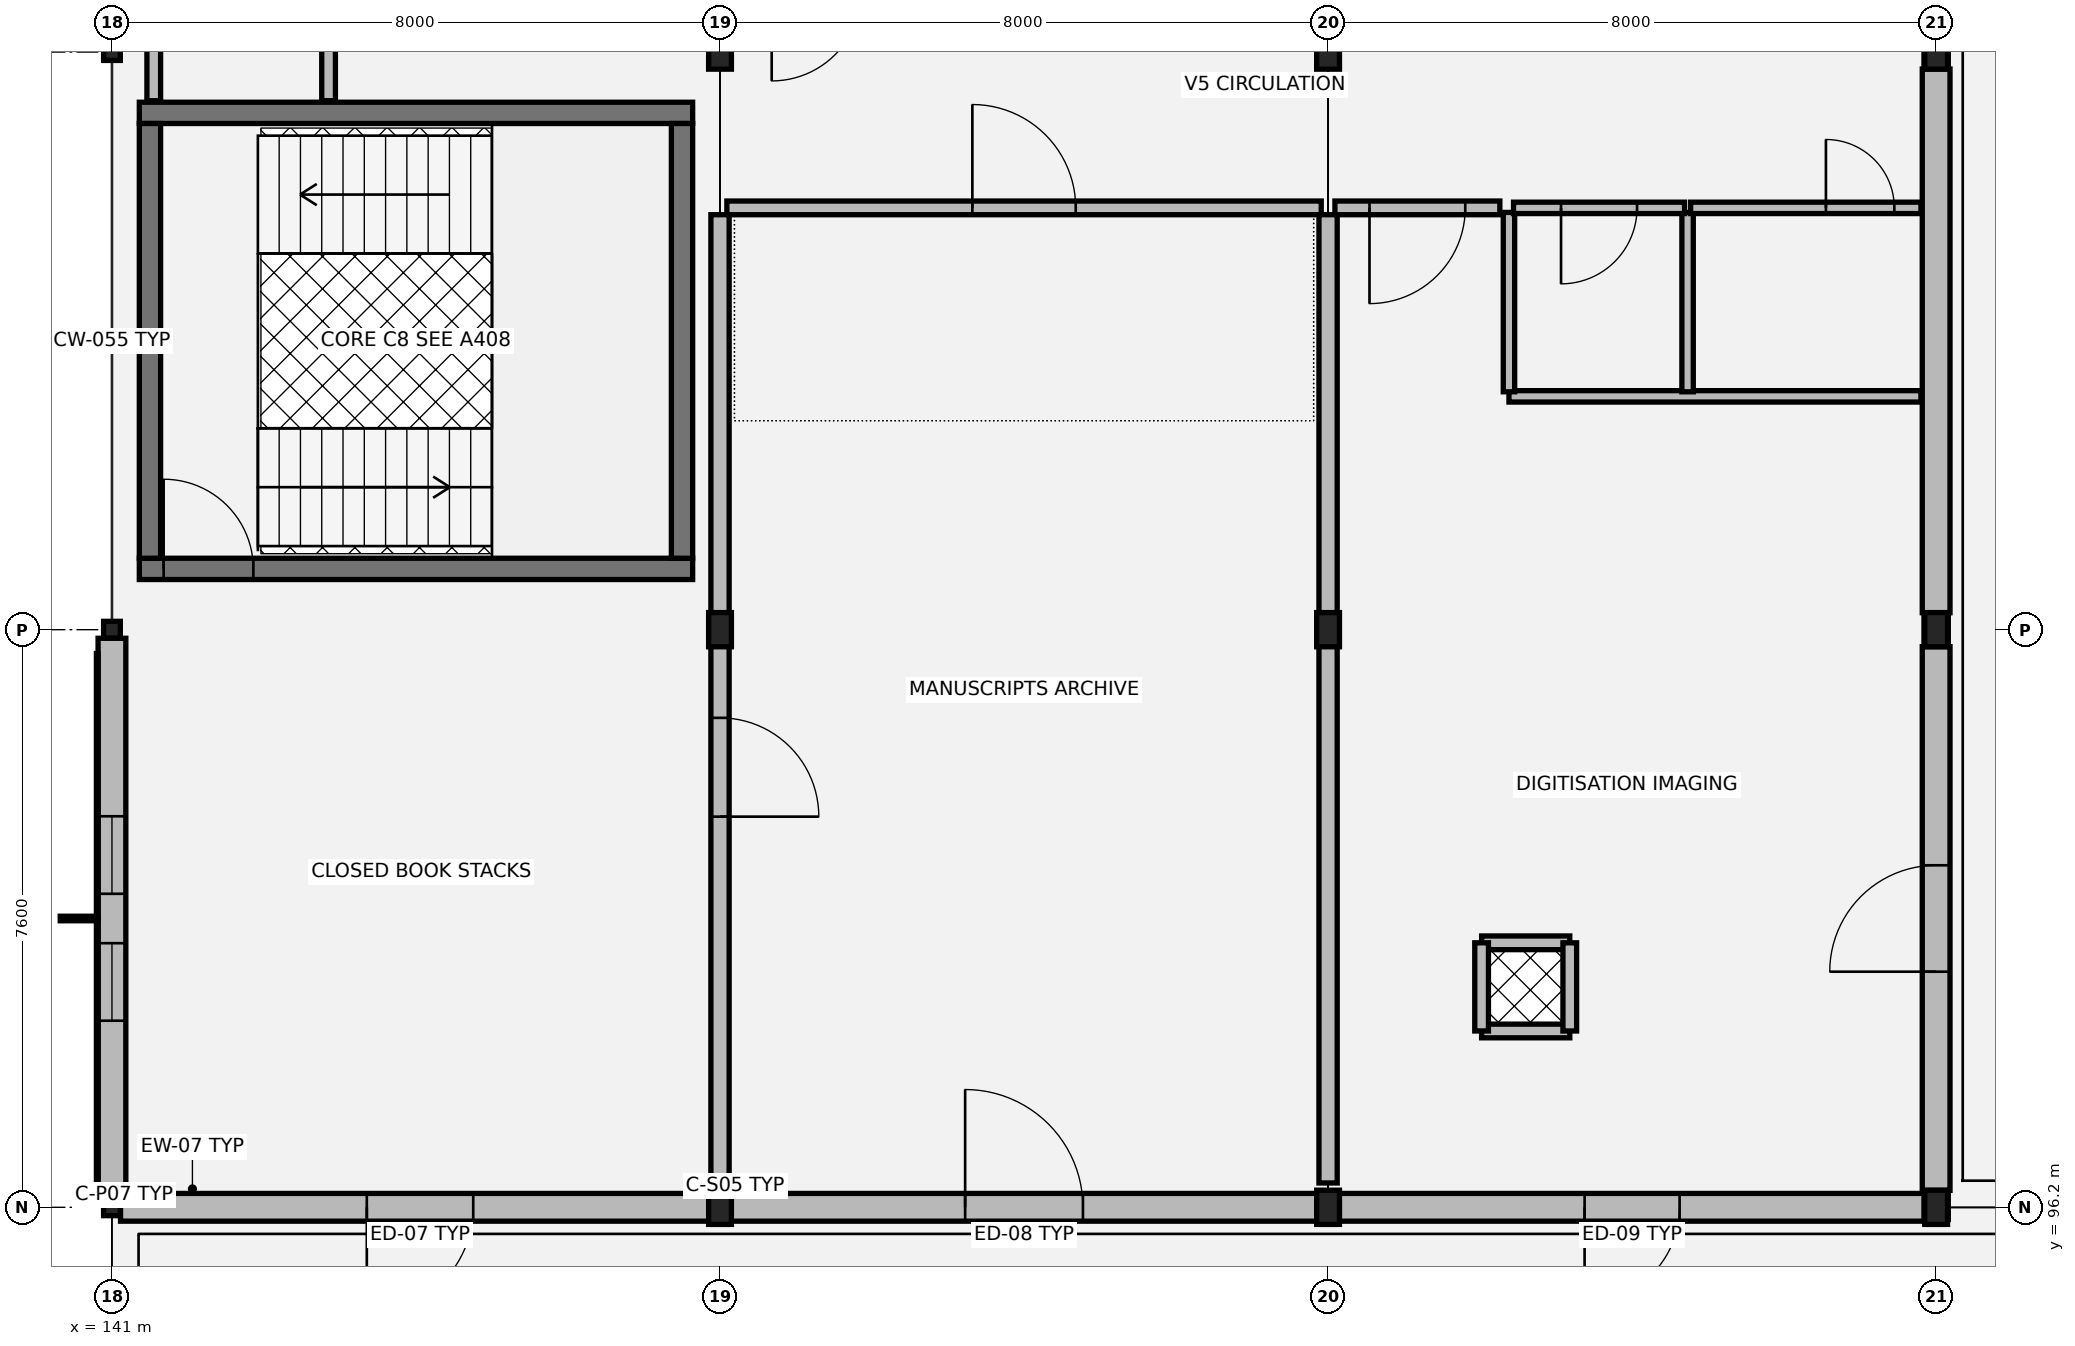
"""IFC4 building model, lengths in metres.
Left out: names, types, materials, properties, quantities, classifications, styles, units other than length and angle.
Written with IfcOpenShell. Run it as: python <this file> out.ifc"""

import sys

from ifc_helpers import new_model, si_unit, direction, frame, frame_2d, origin, origin_2d, place, context, subcontext, project, spatial, rectangle, hollow_rectangle, i_section, extrude, element, fill, save


model = new_model("IFC4")
c1 = context("Model", 3, precision=1e-05, world=origin(), true_north=direction((0.0, 1.0)))
c2 = subcontext(c1, "Body", "Model", "MODEL_VIEW")
j1 = project(units=[si_unit("LENGTHUNIT", "METRE"), si_unit("PLANEANGLEUNIT", "RADIAN")], contexts=[c1])
p1 = place(None, origin())
s1 = spatial("IfcSite", under=j1, at=p1, CompositionType="ELEMENT")
p2 = place(p1, origin())
s2 = spatial("IfcBuilding", under=s1, at=p2, CompositionType="ELEMENT")
p3 = place(p2, frame((0.0, 0.0, 13.26)))
s3 = spatial("IfcBuildingStorey", under=s2, at=p3, CompositionType="ELEMENT", Elevation=13.26)
for number, where, z_axis, x_axis in (
    (1, (141.0, 96.2, 0.0), (0.0, 0.0, 1.0), (1.0, 0.0, 0.0)),
    (2, (141.0, 103.8, 0.0), (0.0, 0.0, 1.0), (1.0, 0.0, 0.0)),
    (3, (141.0, 111.4, 0.0), (0.0, 0.0, 1.0), (1.0, 0.0, 0.0)),
):
    element("IfcColumn", number, at=place(p3, frame(where, z_axis=z_axis, x_axis=x_axis)), inside=s3, PredefinedType="COLUMN", context=c2, shape_type="SweptSolid", body=[
        extrude(hollow_rectangle(XDim=0.22, YDim=0.22, WallThickness=0.01, at=origin_2d()), origin(), (0.0, 0.0, 1.0), 4.055),
    ])
for number, where, z_axis, x_axis in (
    (4, (149.0, 96.2, 0.0), (0.0, 0.0, 1.0), (1.0, 0.0, 0.0)),
    (5, (149.0, 103.8, 0.0), (0.0, 0.0, 1.0), (1.0, 0.0, 0.0)),
    (6, (149.0, 111.4, 0.0), (0.0, 0.0, 1.0), (1.0, 0.0, 0.0)),
    (7, (157.0, 96.2, 0.0), (0.0, 0.0, 1.0), (1.0, 0.0, 0.0)),
    (8, (157.0, 103.8, 0.0), (0.0, 0.0, 1.0), (1.0, 0.0, 0.0)),
    (9, (157.0, 111.4, 0.0), (0.0, 0.0, 1.0), (1.0, 0.0, 0.0)),
):
    element("IfcColumn", number, at=place(p3, frame(where, z_axis=z_axis, x_axis=x_axis)), inside=s3, PredefinedType="COLUMN", context=c2, shape_type="SweptSolid", body=[
        extrude(i_section(OverallWidth=0.3, OverallDepth=0.45, WebThickness=0.014, FlangeThickness=0.026, at=origin_2d()), origin(), (0.0, 0.0, 1.0), 4.055),
    ])
for number, where, z_axis, x_axis in (
    (10, (165.0, 96.2, 0.0), (0.0, 0.0, 1.0), (1.0, 0.0, 0.0)),
    (11, (165.0, 103.8, 0.0), (0.0, 0.0, 1.0), (1.0, 0.0, 0.0)),
    (12, (165.0, 111.4, 0.0), (0.0, 0.0, 1.0), (1.0, 0.0, 0.0)),
):
    element("IfcColumn", number, at=place(p3, frame(where, z_axis=z_axis, x_axis=x_axis)), inside=s3, PredefinedType="COLUMN", context=c2, shape_type="SweptSolid", body=[
        extrude(i_section(OverallWidth=0.3, OverallDepth=0.45, WebThickness=0.014, FlangeThickness=0.026, at=origin_2d()), origin(), (0.0, 0.0, 1.0), 3.85),
    ])
p4 = place(p3, frame((141.113, 96.2, 0.0), z_axis=(0.0, 0.0, 1.0), x_axis=(1.0, 0.0, 0.0)))
e13 = element("IfcWall", 13, at=p4, inside=s3, PredefinedType="SOLIDWALL", context=c2, shape_type="SweptSolid", body=[
    extrude(rectangle(XDim=7.881, YDim=0.365, at=frame_2d((3.94, 0.0))), origin(), (0.0, 0.0, 1.0), 3.33),
])
p5 = place(p4, frame((3.24, 0.0, 0.0)))
e14 = element("IfcOpeningElement", 14, at=p5, cuts=e13, PredefinedType="OPENING", context=c2, shape_type="SweptSolid", body=[
    extrude(rectangle(XDim=1.4, YDim=2.25, at=frame_2d((0.7, 1.125))), frame((0.0, 0.192, 0.0), z_axis=(0.0, -1.0, 0.0), x_axis=(1.0, 0.0, 0.0)), (0.0, 0.0, 1.0), 0.385),
])
p6 = place(p3, frame((149.006, 96.2, 0.0), z_axis=(0.0, 0.0, 1.0), x_axis=(1.0, 0.0, 0.0)))
e15 = element("IfcWall", 15, at=p6, inside=s3, PredefinedType="SOLIDWALL", context=c2, shape_type="SweptSolid", body=[
    extrude(rectangle(XDim=7.988, YDim=0.365, at=frame_2d((3.994, 0.0))), origin(), (0.0, 0.0, 1.0), 3.33),
])
p7 = place(p6, frame((3.219, 0.0, 0.0)))
e16 = element("IfcOpeningElement", 16, at=p7, cuts=e15, PredefinedType="OPENING", context=c2, shape_type="SweptSolid", body=[
    extrude(rectangle(XDim=1.55, YDim=2.28, at=frame_2d((0.775, 1.14))), frame((0.0, 0.192, 0.0), z_axis=(0.0, -1.0, 0.0), x_axis=(1.0, 0.0, 0.0)), (0.0, 0.0, 1.0), 0.385),
])
p8 = place(p3, frame((157.006, 96.2, 0.0), z_axis=(0.0, 0.0, 1.0), x_axis=(1.0, 0.0, 0.0)))
e17 = element("IfcWall", 17, at=p8, inside=s3, PredefinedType="SOLIDWALL", context=c2, shape_type="SweptSolid", body=[
    extrude(rectangle(XDim=7.988, YDim=0.365, at=frame_2d((3.994, 0.0))), origin(), (0.0, 0.0, 1.0), 3.33),
])
p9 = place(p8, frame((3.369, 0.0, 0.0)))
e18 = element("IfcOpeningElement", 18, at=p9, cuts=e17, PredefinedType="OPENING", context=c2, shape_type="SweptSolid", body=[
    extrude(rectangle(XDim=1.25, YDim=2.2, at=frame_2d((0.625, 1.1))), frame((0.0, 0.192, 0.0), z_axis=(0.0, -1.0, 0.0), x_axis=(1.0, 0.0, 0.0)), (0.0, 0.0, 1.0), 0.385),
])
p10 = place(p3, frame((165.0, 96.423, 0.0), z_axis=(0.0, 0.0, 1.0), x_axis=(0.0, 1.0, 0.0)))
e19 = element("IfcWall", 19, at=p10, inside=s3, PredefinedType="SOLIDWALL", context=c2, shape_type="SweptSolid", body=[
    extrude(rectangle(XDim=7.154, YDim=0.365, at=frame_2d((3.577, 0.0))), origin(), (0.0, 0.0, 1.0), 3.27),
])
p11 = place(p10, frame((2.877, 0.0, 0.0)))
e20 = element("IfcOpeningElement", 20, at=p11, cuts=e19, PredefinedType="OPENING", context=c2, shape_type="SweptSolid", body=[
    extrude(rectangle(XDim=1.4, YDim=2.25, at=frame_2d((0.7, 1.125))), frame((0.0, 0.192, 0.0), z_axis=(0.0, -1.0, 0.0), x_axis=(1.0, 0.0, 0.0)), (0.0, 0.0, 1.0), 0.385),
])
p12 = place(p3, frame((165.0, 104.023, 0.0), z_axis=(0.0, 0.0, 1.0), x_axis=(0.0, 1.0, 0.0)))
e21 = element("IfcWall", 21, at=p12, inside=s3, PredefinedType="SOLIDWALL", context=c2, shape_type="SweptSolid", body=[
    extrude(rectangle(XDim=7.154, YDim=0.365, at=frame_2d((3.577, 0.0))), origin(), (0.0, 0.0, 1.0), 3.27),
])
p13 = place(p3, frame((141.0, 103.687, 0.0), z_axis=(0.0, 0.0, 1.0), x_axis=(0.0, -1.0, 0.0)))
e22 = element("IfcWall", 22, at=p13, inside=s3, PredefinedType="SOLIDWALL", context=c2, shape_type="SweptSolid", body=[
    extrude(rectangle(XDim=7.374, YDim=0.365, at=frame_2d((3.687, 0.0))), origin(), (0.0, 0.0, 1.0), 3.48),
])
p14 = place(p13, frame((2.342, 0.0, 0.8)))
e23 = element("IfcOpeningElement", 23, at=p14, cuts=e22, PredefinedType="OPENING", context=c2, shape_type="SweptSolid", body=[
    extrude(rectangle(XDim=1.02, YDim=1.98, at=frame_2d((0.51, 0.99))), frame((0.0, 0.192, 0.0), z_axis=(0.0, -1.0, 0.0), x_axis=(1.0, 0.0, 0.0)), (0.0, 0.0, 1.0), 0.385),
])
p15 = place(p13, frame((4.012, 0.0, 0.8)))
e24 = element("IfcOpeningElement", 24, at=p15, cuts=e22, PredefinedType="OPENING", context=c2, shape_type="SweptSolid", body=[
    extrude(rectangle(XDim=1.02, YDim=1.98, at=frame_2d((0.51, 0.99))), frame((0.0, 0.192, 0.0), z_axis=(0.0, -1.0, 0.0), x_axis=(1.0, 0.0, 0.0)), (0.0, 0.0, 1.0), 0.385),
])
p16 = place(p3, frame((141.36, 104.6, 0.0), z_axis=(0.0, 0.0, 1.0), x_axis=(1.0, 0.0, 0.0)))
e25 = element("IfcWall", 25, at=p16, inside=s3, PredefinedType="SHEAR", context=c2, shape_type="SweptSolid", body=[
    extrude(rectangle(XDim=7.28, YDim=0.28, at=frame_2d((3.64, 0.0))), origin(), (0.0, 0.0, 1.0), 3.845),
])
p17 = place(p16, frame((0.32, 0.0, 0.0)))
e26 = element("IfcOpeningElement", 26, at=p17, cuts=e25, PredefinedType="OPENING", context=c2, shape_type="SweptSolid", body=[
    extrude(rectangle(XDim=1.18, YDim=2.18, at=frame_2d((0.59, 1.09))), frame((0.0, 0.15, 0.0), z_axis=(0.0, -1.0, 0.0), x_axis=(1.0, 0.0, 0.0)), (0.0, 0.0, 1.0), 0.3),
])
p18 = place(p3, frame((141.36, 110.6, 0.0), z_axis=(0.0, 0.0, 1.0), x_axis=(1.0, 0.0, 0.0)))
e27 = element("IfcWall", 27, at=p18, inside=s3, PredefinedType="SHEAR", context=c2, shape_type="SweptSolid", body=[
    extrude(rectangle(XDim=7.28, YDim=0.28, at=frame_2d((3.64, 0.0))), origin(), (0.0, 0.0, 1.0), 3.845),
])
for number, where, z_axis, x_axis in (
    (28, (141.5, 104.74, 0.0), (0.0, 0.0, 1.0), (0.0, 1.0, 0.0)),
    (29, (148.5, 104.74, 0.0), (0.0, 0.0, 1.0), (0.0, 1.0, 0.0)),
):
    element("IfcWall", number, at=place(p3, frame(where, z_axis=z_axis, x_axis=x_axis)), inside=s3, PredefinedType="SHEAR", context=c2, shape_type="SweptSolid", body=[
        extrude(rectangle(XDim=5.72, YDim=0.28, at=frame_2d((2.86, 0.0))), origin(), (0.0, 0.0, 1.0), 3.845),
    ])
for number, where, z_axis, x_axis in (
    (30, (159.02, 98.52, 0.0), (0.0, 0.0, 1.0), (1.0, 0.0, 0.0)),
    (31, (160.18, 99.68, 0.0), (0.0, 0.0, 1.0), (-1.0, 0.0, 0.0)),
    (32, (159.02, 99.68, 0.0), (0.0, 0.0, 1.0), (0.0, -1.0, 0.0)),
    (33, (160.18, 98.52, 0.0), (0.0, 0.0, 1.0), (0.0, 1.0, 0.0)),
):
    element("IfcWall", number, at=place(p3, frame(where, z_axis=z_axis, x_axis=x_axis)), inside=s3, PredefinedType="PARTITIONING", context=c2, shape_type="SweptSolid", body=[
        extrude(rectangle(XDim=1.16, YDim=0.18, at=frame_2d((0.58, 0.0))), origin(), (0.0, 0.0, 1.0), 3.18),
    ])
p19 = place(p3, frame((159.38, 106.87, 0.0), z_axis=(0.0, 0.0, 1.0), x_axis=(1.0, 0.0, 0.0)))
e34 = element("IfcWall", 34, at=p19, inside=s3, PredefinedType="PARTITIONING", context=c2, shape_type="SweptSolid", body=[
    extrude(rectangle(XDim=5.42, YDim=0.15, at=frame_2d((2.71, 0.0))), origin(), (0.0, 0.0, 1.0), 3.18),
])
for number, where, z_axis, x_axis in (
    (35, (159.38, 106.93, 0.0), (0.0, 0.0, 1.0), (0.0, 1.0, 0.0)),
    (36, (161.73, 106.93, 0.0), (0.0, 0.0, 1.0), (0.0, 1.0, 0.0)),
):
    element("IfcWall", number, at=place(p3, frame(where, z_axis=z_axis, x_axis=x_axis)), inside=s3, PredefinedType="PARTITIONING", context=c2, shape_type="SweptSolid", body=[
        extrude(rectangle(XDim=2.36, YDim=0.15, at=frame_2d((1.18, 0.0))), origin(), (0.0, 0.0, 1.0), 3.18),
    ])
p20 = place(p3, frame((159.44, 109.35, 0.0), z_axis=(0.0, 0.0, 1.0), x_axis=(1.0, 0.0, 0.0)))
e37 = element("IfcWall", 37, at=p20, inside=s3, PredefinedType="PARTITIONING", context=c2, shape_type="SweptSolid", body=[
    extrude(rectangle(XDim=2.25, YDim=0.15, at=frame_2d((1.125, 0.0))), origin(), (0.0, 0.0, 1.0), 3.18),
])
p21 = place(p20, frame((0.625, 0.0, 0.0)))
e38 = element("IfcOpeningElement", 38, at=p21, cuts=e37, PredefinedType="OPENING", context=c2, shape_type="SweptSolid", body=[
    extrude(rectangle(XDim=1.0, YDim=2.15, at=frame_2d((0.5, 1.075))), frame((0.0, 0.085, 0.0), z_axis=(0.0, -1.0, 0.0), x_axis=(1.0, 0.0, 0.0)), (0.0, 0.0, 1.0), 0.17),
])
p22 = place(p3, frame((161.77, 109.35, 0.0), z_axis=(0.0, 0.0, 1.0), x_axis=(1.0, 0.0, 0.0)))
e39 = element("IfcWall", 39, at=p22, inside=s3, PredefinedType="PARTITIONING", context=c2, shape_type="SweptSolid", body=[
    extrude(rectangle(XDim=3.03, YDim=0.15, at=frame_2d((1.515, 0.0))), origin(), (0.0, 0.0, 1.0), 3.18),
])
p23 = place(p22, frame((1.78, 0.0, 0.0)))
e40 = element("IfcOpeningElement", 40, at=p23, cuts=e39, PredefinedType="OPENING", context=c2, shape_type="SweptSolid", body=[
    extrude(rectangle(XDim=0.9, YDim=2.15, at=frame_2d((0.45, 1.075))), frame((0.0, 0.085, 0.0), z_axis=(0.0, -1.0, 0.0), x_axis=(1.0, 0.0, 0.0)), (0.0, 0.0, 1.0), 0.17),
])
p24 = place(p3, frame((149.09, 109.35, 0.0), z_axis=(0.0, 0.0, 1.0), x_axis=(1.0, 0.0, 0.0)))
e41 = element("IfcWall", 41, at=p24, inside=s3, PredefinedType="PARTITIONING", context=c2, shape_type="SweptSolid", body=[
    extrude(rectangle(XDim=7.82, YDim=0.18, at=frame_2d((3.91, 0.0))), origin(), (0.0, 0.0, 1.0), 3.18),
])
p25 = place(p24, frame((3.23, 0.0, 0.0)))
e42 = element("IfcOpeningElement", 42, at=p25, cuts=e41, PredefinedType="OPENING", context=c2, shape_type="SweptSolid", body=[
    extrude(rectangle(XDim=1.36, YDim=2.2, at=frame_2d((0.68, 1.1))), frame((0.0, 0.1, 0.0), z_axis=(0.0, -1.0, 0.0), x_axis=(1.0, 0.0, 0.0)), (0.0, 0.0, 1.0), 0.2),
])
p26 = place(p3, frame((157.09, 109.35, 0.0), z_axis=(0.0, 0.0, 1.0), x_axis=(1.0, 0.0, 0.0)))
e43 = element("IfcWall", 43, at=p26, inside=s3, PredefinedType="PARTITIONING", context=c2, shape_type="SweptSolid", body=[
    extrude(rectangle(XDim=2.17, YDim=0.18, at=frame_2d((1.085, 0.0))), origin(), (0.0, 0.0, 1.0), 3.18),
])
p27 = place(p26, frame((0.455, 0.0, 0.0)))
e44 = element("IfcOpeningElement", 44, at=p27, cuts=e43, PredefinedType="OPENING", context=c2, shape_type="SweptSolid", body=[
    extrude(rectangle(XDim=1.26, YDim=2.2, at=frame_2d((0.63, 1.1))), frame((0.0, 0.1, 0.0), z_axis=(0.0, -1.0, 0.0), x_axis=(1.0, 0.0, 0.0)), (0.0, 0.0, 1.0), 0.2),
])
for number, where, z_axis, x_axis in (
    (45, (141.55, 110.76, 0.0), (0.0, 0.0, 1.0), (0.0, 1.0, 0.0)),
    (46, (143.85, 110.76, 0.0), (0.0, 0.0, 1.0), (0.0, 1.0, 0.0)),
):
    element("IfcWall", number, at=place(p3, frame(where, z_axis=z_axis, x_axis=x_axis)), inside=s3, PredefinedType="PARTITIONING", context=c2, shape_type="SweptSolid", body=[
        extrude(rectangle(XDim=1.44, YDim=0.18, at=frame_2d((0.72, 0.0))), origin(), (0.0, 0.0, 1.0), 3.18),
    ])
p28 = place(p3, frame((149.0, 96.52, 0.0), z_axis=(0.0, 0.0, 1.0), x_axis=(0.0, 1.0, 0.0)))
e47 = element("IfcWall", 47, at=p28, inside=s3, PredefinedType="SOLIDWALL", context=c2, shape_type="SweptSolid", body=[
    extrude(rectangle(XDim=12.74, YDim=0.24, at=frame_2d((6.37, 0.0))), origin(), (0.0, 0.0, 1.0), 3.18),
])
p29 = place(p28, frame((4.82, 0.0, 0.0)))
e48 = element("IfcOpeningElement", 48, at=p29, cuts=e47, PredefinedType="OPENING", context=c2, shape_type="SweptSolid", body=[
    extrude(rectangle(XDim=1.3, YDim=2.2, at=frame_2d((0.65, 1.1))), frame((0.0, 0.13, 0.0), z_axis=(0.0, -1.0, 0.0), x_axis=(1.0, 0.0, 0.0)), (0.0, 0.0, 1.0), 0.26),
])
p30 = place(p3, frame((157.0, 96.52, 0.0), z_axis=(0.0, 0.0, 1.0), x_axis=(0.0, 1.0, 0.0)))
e49 = element("IfcWall", 49, at=p30, inside=s3, PredefinedType="SOLIDWALL", context=c2, shape_type="SweptSolid", body=[
    extrude(rectangle(XDim=12.74, YDim=0.24, at=frame_2d((6.37, 0.0))), origin(), (0.0, 0.0, 1.0), 3.18),
])
p31 = place(p5, origin())
e50 = element("IfcDoor", 50, at=p31, inside=s3, OperationType="SINGLE_SWING_RIGHT", PredefinedType="DOOR", context=c2, shape_type="SweptSolid", body=[
    extrude(rectangle(XDim=1.4, YDim=2.25, at=frame_2d((0.7, 1.125))), frame((0.0, 0.025, 0.0), z_axis=(0.0, -1.0, 0.0), x_axis=(1.0, 0.0, 0.0)), (0.0, 0.0, 1.0), 0.05),
])
fill(e14, e50)
p32 = place(p7, origin())
e51 = element("IfcDoor", 51, at=p32, inside=s3, OperationType="SINGLE_SWING_LEFT", PredefinedType="DOOR", context=c2, shape_type="SweptSolid", body=[
    extrude(rectangle(XDim=1.55, YDim=2.28, at=frame_2d((0.775, 1.14))), frame((0.0, 0.025, 0.0), z_axis=(0.0, -1.0, 0.0), x_axis=(1.0, 0.0, 0.0)), (0.0, 0.0, 1.0), 0.05),
])
fill(e16, e51)
p33 = place(p9, origin())
e52 = element("IfcDoor", 52, at=p33, inside=s3, OperationType="SINGLE_SWING_RIGHT", PredefinedType="DOOR", context=c2, shape_type="SweptSolid", body=[
    extrude(rectangle(XDim=1.25, YDim=2.2, at=frame_2d((0.625, 1.1))), frame((0.0, 0.025, 0.0), z_axis=(0.0, -1.0, 0.0), x_axis=(1.0, 0.0, 0.0)), (0.0, 0.0, 1.0), 0.05),
])
fill(e18, e52)
p34 = place(p11, origin())
e53 = element("IfcDoor", 53, at=p34, inside=s3, OperationType="SINGLE_SWING_LEFT", PredefinedType="DOOR", context=c2, shape_type="SweptSolid", body=[
    extrude(rectangle(XDim=1.4, YDim=2.25, at=frame_2d((0.7, 1.125))), frame((0.0, 0.025, 0.0), z_axis=(0.0, -1.0, 0.0), x_axis=(1.0, 0.0, 0.0)), (0.0, 0.0, 1.0), 0.05),
])
fill(e20, e53)
p35 = place(p14, origin())
e54 = element("IfcWindow", 54, at=p35, inside=s3, PartitioningType="SINGLE_PANEL", PredefinedType="WINDOW", context=c2, shape_type="SweptSolid", body=[
    extrude(rectangle(XDim=1.02, YDim=1.98, at=frame_2d((0.51, 0.99))), frame((0.0, 0.03, 0.0), z_axis=(0.0, -1.0, 0.0), x_axis=(1.0, 0.0, 0.0)), (0.0, 0.0, 1.0), 0.06),
])
fill(e23, e54)
p36 = place(p15, origin())
e55 = element("IfcWindow", 55, at=p36, inside=s3, PartitioningType="SINGLE_PANEL", PredefinedType="WINDOW", context=c2, shape_type="SweptSolid", body=[
    extrude(rectangle(XDim=1.02, YDim=1.98, at=frame_2d((0.51, 0.99))), frame((0.0, 0.03, 0.0), z_axis=(0.0, -1.0, 0.0), x_axis=(1.0, 0.0, 0.0)), (0.0, 0.0, 1.0), 0.06),
])
fill(e24, e55)
p37 = place(p17, origin())
e56 = element("IfcDoor", 56, at=p37, inside=s3, OperationType="SINGLE_SWING_LEFT", PredefinedType="DOOR", context=c2, shape_type="SweptSolid", body=[
    extrude(rectangle(XDim=1.18, YDim=2.18, at=frame_2d((0.59, 1.09))), frame((0.0, 0.025, 0.0), z_axis=(0.0, -1.0, 0.0), x_axis=(1.0, 0.0, 0.0)), (0.0, 0.0, 1.0), 0.05),
])
fill(e26, e56)
p38 = place(p21, origin())
e57 = element("IfcDoor", 57, at=p38, inside=s3, OperationType="SINGLE_SWING_RIGHT", PredefinedType="DOOR", context=c2, shape_type="SweptSolid", body=[
    extrude(rectangle(XDim=1.0, YDim=2.15, at=frame_2d((0.5, 1.075))), frame((0.0, 0.025, 0.0), z_axis=(0.0, -1.0, 0.0), x_axis=(1.0, 0.0, 0.0)), (0.0, 0.0, 1.0), 0.05),
])
fill(e38, e57)
p39 = place(p23, origin())
e58 = element("IfcDoor", 58, at=p39, inside=s3, OperationType="SINGLE_SWING_LEFT", PredefinedType="DOOR", context=c2, shape_type="SweptSolid", body=[
    extrude(rectangle(XDim=0.9, YDim=2.15, at=frame_2d((0.45, 1.075))), frame((0.0, 0.025, 0.0), z_axis=(0.0, -1.0, 0.0), x_axis=(1.0, 0.0, 0.0)), (0.0, 0.0, 1.0), 0.05),
])
fill(e40, e58)
p40 = place(p29, origin())
e59 = element("IfcDoor", 59, at=p40, inside=s3, OperationType="SINGLE_SWING_RIGHT", PredefinedType="DOOR", context=c2, shape_type="SweptSolid", body=[
    extrude(rectangle(XDim=1.3, YDim=2.2, at=frame_2d((0.65, 1.1))), frame((0.0, 0.025, 0.0), z_axis=(0.0, -1.0, 0.0), x_axis=(1.0, 0.0, 0.0)), (0.0, 0.0, 1.0), 0.05),
])
fill(e48, e59)
p41 = place(p25, origin())
e60 = element("IfcDoor", 60, at=p41, inside=s3, OperationType="SINGLE_SWING_LEFT", PredefinedType="DOOR", context=c2, shape_type="SweptSolid", body=[
    extrude(rectangle(XDim=1.36, YDim=2.2, at=frame_2d((0.68, 1.1))), frame((0.0, 0.025, 0.0), z_axis=(0.0, -1.0, 0.0), x_axis=(1.0, 0.0, 0.0)), (0.0, 0.0, 1.0), 0.05),
])
fill(e42, e60)
p42 = place(p27, origin())
e61 = element("IfcDoor", 61, at=p42, inside=s3, OperationType="SINGLE_SWING_RIGHT", PredefinedType="DOOR", context=c2, shape_type="SweptSolid", body=[
    extrude(rectangle(XDim=1.26, YDim=2.2, at=frame_2d((0.63, 1.1))), frame((0.0, 0.025, 0.0), z_axis=(0.0, -1.0, 0.0), x_axis=(1.0, 0.0, 0.0)), (0.0, 0.0, 1.0), 0.05),
])
fill(e44, e61)
save(model, sys.argv[1])
